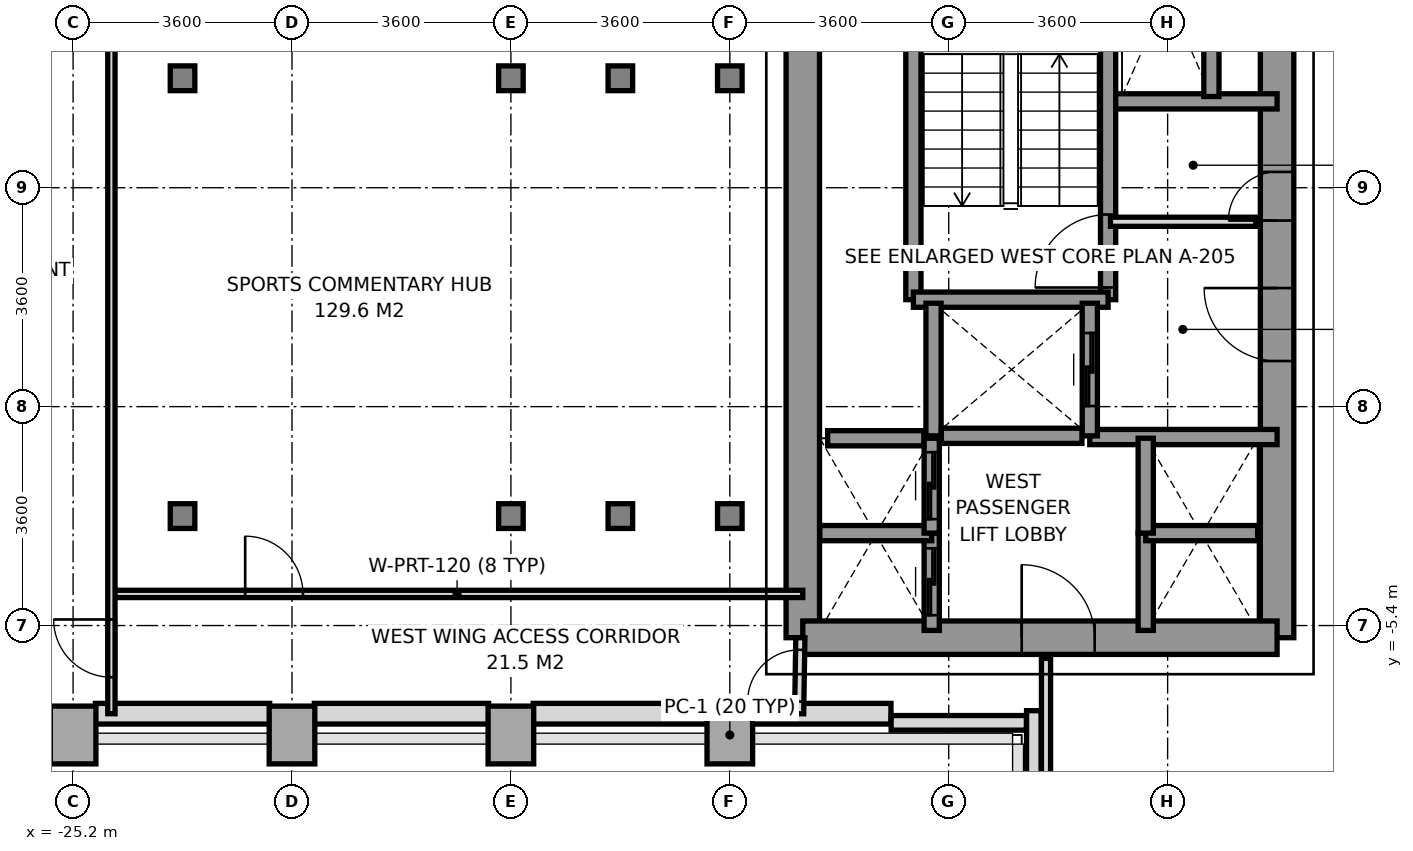
"""IFC4 building model, lengths in metres.
Left out: names, types, materials, properties, quantities, classifications, styles, units other than length and angle.
Written with IfcOpenShell. Run it as: python <this file> out.ifc"""

import sys

from ifc_helpers import new_model, si_unit, direction, frame, frame_2d, origin, origin_2d, place, context, subcontext, project, spatial, rectangle, i_section, extrude, source, transform, mapped, element, fill, save


model = new_model("IFC4")
c1 = context("Model", 3, precision=1e-05, world=origin(), true_north=direction((0.0, 1.0)))
c2 = subcontext(c1, "Body", "Model", "MODEL_VIEW")
j1 = project(units=[si_unit("LENGTHUNIT", "METRE"), si_unit("PLANEANGLEUNIT", "RADIAN")], contexts=[c1])
p1 = place(None, origin())
s1 = spatial("IfcSite", under=j1, at=p1, CompositionType="ELEMENT")
p2 = place(p1, origin())
s2 = spatial("IfcBuilding", under=s1, at=p2, CompositionType="ELEMENT")
p3 = place(p2, frame((0.0, 0.0, 74.8)))
s3 = spatial("IfcBuildingStorey", under=s2, at=p3, CompositionType="ELEMENT", Elevation=74.8)
m1 = source(origin(), c2, "Body", "SweptSolid", [
    extrude(rectangle(XDim=0.75, YDim=0.95, at=origin_2d()), origin(), (0.0, 0.0, 1.0), 3.2),
])
p4 = place(p3, frame((-25.2, -7.2, 0.0), z_axis=(0.0, 0.0, 1.0), x_axis=(1.0, 0.0, 0.0)))
e1 = element("IfcColumn", 1, at=p4, inside=s3, PredefinedType="COLUMN", context=c2, shape_type="MappedRepresentation", body=[
    mapped(m1, transform((0.0, 0.0, 0.0), x_axis=(1.0, 0.0, 0.0), y_axis=(0.0, 1.0, 0.0), z_axis=(0.0, 0.0, 1.0), scale=1.0)),
])
m2 = source(origin(), c2, "Body", "SweptSolid", [
    extrude(i_section(OverallWidth=0.404, OverallDepth=0.407, WebThickness=0.022, FlangeThickness=0.035, at=origin_2d()), origin(), (0.0, 0.0, 1.0), 3.2),
])
for number, where, z_axis, x_axis in (
    (2, (-23.4, -3.6, 0.0), (0.0, 0.0, 1.0), (1.0, 0.0, 0.0)),
    (3, (-23.4, 3.6, 0.0), (0.0, 0.0, 1.0), (1.0, 0.0, 0.0)),
):
    element("IfcColumn", number, at=place(p3, frame(where, z_axis=z_axis, x_axis=x_axis)), inside=s3, PredefinedType="COLUMN", context=c2, shape_type="MappedRepresentation", body=[
        mapped(m2, transform((0.0, 0.0, 0.0), x_axis=(1.0, 0.0, 0.0), y_axis=(0.0, 1.0, 0.0), z_axis=(0.0, 0.0, 1.0), scale=1.0)),
    ])
for number, where, z_axis, x_axis in (
    (4, (-21.6, -7.2, 0.0), (0.0, 0.0, 1.0), (1.0, 0.0, 0.0)),
    (5, (-18.0, -7.2, 0.0), (0.0, 0.0, 1.0), (1.0, 0.0, 0.0)),
):
    element("IfcColumn", number, at=place(p3, frame(where, z_axis=z_axis, x_axis=x_axis)), inside=s3, PredefinedType="COLUMN", context=c2, shape_type="MappedRepresentation", body=[
        mapped(m1, transform((0.0, 0.0, 0.0), x_axis=(1.0, 0.0, 0.0), y_axis=(0.0, 1.0, 0.0), z_axis=(0.0, 0.0, 1.0), scale=1.0)),
    ])
for number, where, z_axis, x_axis in (
    (6, (-18.0, -3.6, 0.0), (0.0, 0.0, 1.0), (1.0, 0.0, 0.0)),
    (7, (-18.0, 3.6, 0.0), (0.0, 0.0, 1.0), (1.0, 0.0, 0.0)),
    (8, (-16.2, -3.6, 0.0), (0.0, 0.0, 1.0), (1.0, 0.0, 0.0)),
    (9, (-16.2, 3.6, 0.0), (0.0, 0.0, 1.0), (1.0, 0.0, 0.0)),
):
    element("IfcColumn", number, at=place(p3, frame(where, z_axis=z_axis, x_axis=x_axis)), inside=s3, PredefinedType="COLUMN", context=c2, shape_type="MappedRepresentation", body=[
        mapped(m2, transform((0.0, 0.0, 0.0), x_axis=(1.0, 0.0, 0.0), y_axis=(0.0, 1.0, 0.0), z_axis=(0.0, 0.0, 1.0), scale=1.0)),
    ])
p5 = place(p3, frame((-14.4, -7.2, 0.0), z_axis=(0.0, 0.0, 1.0), x_axis=(1.0, 0.0, 0.0)))
e10 = element("IfcColumn", 10, at=p5, inside=s3, PredefinedType="COLUMN", context=c2, shape_type="MappedRepresentation", body=[
    mapped(m1, transform((0.0, 0.0, 0.0), x_axis=(1.0, 0.0, 0.0), y_axis=(0.0, 1.0, 0.0), z_axis=(0.0, 0.0, 1.0), scale=1.0)),
])
for number, where, z_axis, x_axis in (
    (11, (-14.4, -3.6, 0.0), (0.0, 0.0, 1.0), (1.0, 0.0, 0.0)),
    (12, (-14.4, 3.6, 0.0), (0.0, 0.0, 1.0), (1.0, 0.0, 0.0)),
):
    element("IfcColumn", number, at=place(p3, frame(where, z_axis=z_axis, x_axis=x_axis)), inside=s3, PredefinedType="COLUMN", context=c2, shape_type="MappedRepresentation", body=[
        mapped(m2, transform((0.0, 0.0, 0.0), x_axis=(1.0, 0.0, 0.0), y_axis=(0.0, 1.0, 0.0), z_axis=(0.0, 0.0, 1.0), scale=1.0)),
    ])
for number, where, z_axis, x_axis in (
    (13, (-24.833, -6.85, 0.0), (0.0, 0.0, 1.0), (1.0, 0.0, 0.0)),
    (14, (-21.233, -6.85, 0.0), (0.0, 0.0, 1.0), (1.0, 0.0, 0.0)),
    (15, (-17.633, -6.85, 0.0), (0.0, 0.0, 1.0), (1.0, 0.0, 0.0)),
):
    element("IfcWall", number, at=place(p3, frame(where, z_axis=z_axis, x_axis=x_axis)), inside=s3, PredefinedType="SOLIDWALL", context=c2, shape_type="SweptSolid", body=[
        extrude(rectangle(XDim=2.866, YDim=0.34, at=frame_2d((1.433, 0.0))), origin(), (0.0, 0.0, 1.0), 2.45),
    ])
p6 = place(p3, frame((-14.033, -6.85, 0.0), z_axis=(0.0, 0.0, 1.0), x_axis=(1.0, 0.0, 0.0)))
e16 = element("IfcWall", 16, at=p6, inside=s3, PredefinedType="SOLIDWALL", context=c2, shape_type="SweptSolid", body=[
    extrude(rectangle(XDim=2.283, YDim=0.34, at=frame_2d((1.142, 0.0))), origin(), (0.0, 0.0, 1.0), 3.2),
])
p7 = place(p3, frame((-9.4, -8.397, 0.0), z_axis=(0.0, 0.0, 1.0), x_axis=(0.0, 1.0, 0.0)))
e17 = element("IfcWall", 17, at=p7, inside=s3, PredefinedType="PARAPET", context=c2, shape_type="SweptSolid", body=[
    extrude(rectangle(XDim=1.597, YDim=0.24, at=frame_2d((0.798, 0.0))), origin(), (0.0, 0.0, 1.0), 1.15),
])
p8 = place(p3, frame((-9.523, -7.0, 0.0), z_axis=(0.0, 0.0, 1.0), x_axis=(-1.0, 0.0, 0.0)))
e18 = element("IfcWall", 18, at=p8, inside=s3, PredefinedType="PARAPET", context=c2, shape_type="SweptSolid", body=[
    extrude(rectangle(XDim=2.224, YDim=0.24, at=frame_2d((1.112, 0.0))), origin(), (0.0, 0.0, 1.0), 1.15),
])
p9 = place(p3, frame((-13.2, -5.6, 0.0), z_axis=(0.0, 0.0, 1.0), x_axis=(0.0, 1.0, 0.0)))
e19 = element("IfcWall", 19, at=p9, inside=s3, PredefinedType="SHEAR", context=c2, shape_type="SweptSolid", body=[
    extrude(rectangle(XDim=11.2, YDim=0.55, at=frame_2d((5.6, 0.0))), origin(), (0.0, 0.0, 1.0), 3.2),
])
p10 = place(p3, frame((-5.4, -5.6, 0.0), z_axis=(0.0, 0.0, 1.0), x_axis=(0.0, 1.0, 0.0)))
e20 = element("IfcWall", 20, at=p10, inside=s3, PredefinedType="SHEAR", context=c2, shape_type="SweptSolid", body=[
    extrude(rectangle(XDim=12.5, YDim=0.55, at=frame_2d((6.25, 0.0))), origin(), (0.0, 0.0, 1.0), 3.2),
])
p11 = place(p10, frame((4.55, 0.0, 0.0)))
e21 = element("IfcOpeningElement", 21, at=p11, cuts=e20, PredefinedType="OPENING", context=c2, shape_type="SweptSolid", body=[
    extrude(rectangle(XDim=1.2, YDim=2.2, at=frame_2d((0.6, 1.1))), frame((0.0, 0.285, 0.0), z_axis=(0.0, -1.0, 0.0), x_axis=(1.0, 0.0, 0.0)), (0.0, 0.0, 1.0), 0.57),
])
p12 = place(p10, frame((6.86, 0.0, 0.0)))
e22 = element("IfcOpeningElement", 22, at=p12, cuts=e20, PredefinedType="OPENING", context=c2, shape_type="SweptSolid", body=[
    extrude(rectangle(XDim=0.8, YDim=2.1, at=frame_2d((0.4, 1.05))), frame((0.0, 0.285, 0.0), z_axis=(0.0, -1.0, 0.0), x_axis=(1.0, 0.0, 0.0)), (0.0, 0.0, 1.0), 0.57),
])
p13 = place(p3, frame((-13.2, -5.6, 0.0), z_axis=(0.0, 0.0, 1.0), x_axis=(1.0, 0.0, 0.0)))
e23 = element("IfcWall", 23, at=p13, inside=s3, PredefinedType="SHEAR", context=c2, shape_type="SweptSolid", body=[
    extrude(rectangle(XDim=7.8, YDim=0.55, at=frame_2d((3.9, 0.0))), origin(), (0.0, 0.0, 1.0), 3.2),
])
p14 = place(p13, frame((3.6, 0.0, 0.0)))
e24 = element("IfcOpeningElement", 24, at=p14, cuts=e23, PredefinedType="OPENING", context=c2, shape_type="SweptSolid", body=[
    extrude(rectangle(XDim=1.2, YDim=2.2, at=frame_2d((0.6, 1.1))), frame((0.0, 0.285, 0.0), z_axis=(0.0, -1.0, 0.0), x_axis=(1.0, 0.0, 0.0)), (0.0, 0.0, 1.0), 0.57),
])
p15 = place(p3, frame((-8.18, 3.22, 0.0), z_axis=(0.0, 0.0, 1.0), x_axis=(1.0, 0.0, 0.0)))
e25 = element("IfcWall", 25, at=p15, inside=s3, PredefinedType="SOLIDWALL", context=c2, shape_type="SweptSolid", body=[
    extrude(rectangle(XDim=2.78, YDim=0.25, at=frame_2d((1.39, 0.0))), origin(), (0.0, 0.0, 1.0), 3.2),
])
p16 = place(p3, frame((-8.48, -2.3, 0.0), z_axis=(0.0, 0.0, 1.0), x_axis=(1.0, 0.0, 0.0)))
e26 = element("IfcWall", 26, at=p16, inside=s3, PredefinedType="SOLIDWALL", context=c2, shape_type="SweptSolid", body=[
    extrude(rectangle(XDim=3.08, YDim=0.25, at=frame_2d((1.54, 0.0))), origin(), (0.0, 0.0, 1.0), 3.2),
])
p17 = place(p3, frame((-8.179, -0.041, 0.0), z_axis=(0.0, 0.0, 1.0), x_axis=(0.0, 1.0, 0.0)))
e27 = element("IfcWall", 27, at=p17, inside=s3, PredefinedType="SOLIDWALL", context=c2, shape_type="SweptSolid", body=[
    extrude(rectangle(XDim=6.941, YDim=0.25, at=frame_2d((3.47, 0.0))), origin(), (0.0, 0.0, 1.0), 3.2),
])
p18 = place(p17, frame((0.2, 0.0, 0.0)))
e28 = element("IfcOpeningElement", 28, at=p18, cuts=e27, PredefinedType="OPENING", context=c2, shape_type="SweptSolid", body=[
    extrude(rectangle(XDim=1.2, YDim=2.2, at=frame_2d((0.6, 1.1))), frame((0.0, 0.135, 0.0), z_axis=(0.0, -1.0, 0.0), x_axis=(1.0, 0.0, 0.0)), (0.0, 0.0, 1.0), 0.27),
])
p19 = place(p3, frame((-11.381, -0.041, 0.0), z_axis=(0.0, 0.0, 1.0), x_axis=(0.0, 1.0, 0.0)))
e29 = element("IfcWall", 29, at=p19, inside=s3, PredefinedType="SOLIDWALL", context=c2, shape_type="SweptSolid", body=[
    extrude(rectangle(XDim=6.941, YDim=0.25, at=frame_2d((3.47, 0.0))), origin(), (0.0, 0.0, 1.0), 3.2),
])
p20 = place(p3, frame((-11.381, -0.041, 0.0), z_axis=(0.0, 0.0, 1.0), x_axis=(1.0, 0.0, 0.0)))
e30 = element("IfcWall", 30, at=p20, inside=s3, PredefinedType="SOLIDWALL", context=c2, shape_type="SweptSolid", body=[
    extrude(rectangle(XDim=3.202, YDim=0.25, at=frame_2d((1.601, 0.0))), origin(), (0.0, 0.0, 1.0), 3.2),
])
p21 = place(p3, frame((-11.05, -2.28, 0.0), z_axis=(0.0, 0.0, 1.0), x_axis=(0.0, 1.0, 0.0)))
e31 = element("IfcWall", 31, at=p21, inside=s3, PredefinedType="SOLIDWALL", context=c2, shape_type="SweptSolid", body=[
    extrude(rectangle(XDim=2.18, YDim=0.25, at=frame_2d((1.09, 0.0))), origin(), (0.0, 0.0, 1.0), 3.2),
])
p22 = place(p3, frame((-8.48, -2.28, 0.0), z_axis=(0.0, 0.0, 1.0), x_axis=(0.0, 1.0, 0.0)))
e32 = element("IfcWall", 32, at=p22, inside=s3, PredefinedType="SOLIDWALL", context=c2, shape_type="SweptSolid", body=[
    extrude(rectangle(XDim=2.18, YDim=0.25, at=frame_2d((1.09, 0.0))), origin(), (0.0, 0.0, 1.0), 3.2),
])
p23 = place(p22, frame((0.49, 0.0, 0.0)))
e33 = element("IfcOpeningElement", 33, at=p23, cuts=e32, PredefinedType="OPENING", context=c2, shape_type="SweptSolid", body=[
    extrude(rectangle(XDim=1.2, YDim=2.2, at=frame_2d((0.6, 1.1))), frame((0.0, 0.135, 0.0), z_axis=(0.0, -1.0, 0.0), x_axis=(1.0, 0.0, 0.0)), (0.0, 0.0, 1.0), 0.27),
])
p24 = place(p3, frame((-10.921, -2.28, 0.0), z_axis=(0.0, 0.0, 1.0), x_axis=(1.0, 0.0, 0.0)))
e34 = element("IfcWall", 34, at=p24, inside=s3, PredefinedType="SOLIDWALL", context=c2, shape_type="SweptSolid", body=[
    extrude(rectangle(XDim=2.312, YDim=0.25, at=frame_2d((1.156, 0.0))), origin(), (0.0, 0.0, 1.0), 3.2),
])
p25 = place(p3, frame((-11.08, -5.48, 0.0), z_axis=(0.0, 0.0, 1.0), x_axis=(0.0, 1.0, 0.0)))
e35 = element("IfcWall", 35, at=p25, inside=s3, PredefinedType="SOLIDWALL", context=c2, shape_type="SweptSolid", body=[
    extrude(rectangle(XDim=1.6, YDim=0.25, at=frame_2d((0.8, 0.0))), origin(), (0.0, 0.0, 1.0), 3.2),
])
p26 = place(p25, frame((0.25, 0.0, 0.0)))
e36 = element("IfcOpeningElement", 36, at=p26, cuts=e35, PredefinedType="OPENING", context=c2, shape_type="SweptSolid", body=[
    extrude(rectangle(XDim=1.1, YDim=2.2, at=frame_2d((0.55, 1.1))), frame((0.0, 0.135, 0.0), z_axis=(0.0, -1.0, 0.0), x_axis=(1.0, 0.0, 0.0)), (0.0, 0.0, 1.0), 0.27),
])
p27 = place(p3, frame((-12.92, -3.88, 0.0), z_axis=(0.0, 0.0, 1.0), x_axis=(1.0, 0.0, 0.0)))
e37 = element("IfcWall", 37, at=p27, inside=s3, PredefinedType="SOLIDWALL", context=c2, shape_type="SweptSolid", body=[
    extrude(rectangle(XDim=1.84, YDim=0.25, at=frame_2d((0.92, 0.0))), origin(), (0.0, 0.0, 1.0), 3.2),
])
p28 = place(p3, frame((-11.08, -3.88, 0.0), z_axis=(0.0, 0.0, 1.0), x_axis=(0.0, 1.0, 0.0)))
e38 = element("IfcWall", 38, at=p28, inside=s3, PredefinedType="SOLIDWALL", context=c2, shape_type="SweptSolid", body=[
    extrude(rectangle(XDim=1.56, YDim=0.25, at=frame_2d((0.78, 0.0))), origin(), (0.0, 0.0, 1.0), 3.2),
])
p29 = place(p28, frame((0.23, 0.0, 0.0)))
e39 = element("IfcOpeningElement", 39, at=p29, cuts=e38, PredefinedType="OPENING", context=c2, shape_type="SweptSolid", body=[
    extrude(rectangle(XDim=1.1, YDim=2.2, at=frame_2d((0.55, 1.1))), frame((0.0, 0.135, 0.0), z_axis=(0.0, -1.0, 0.0), x_axis=(1.0, 0.0, 0.0)), (0.0, 0.0, 1.0), 0.27),
])
p30 = place(p3, frame((-12.791, -2.32, 0.0), z_axis=(0.0, 0.0, 1.0), x_axis=(1.0, 0.0, 0.0)))
e40 = element("IfcWall", 40, at=p30, inside=s3, PredefinedType="SOLIDWALL", context=c2, shape_type="SweptSolid", body=[
    extrude(rectangle(XDim=1.582, YDim=0.25, at=frame_2d((0.791, 0.0))), origin(), (0.0, 0.0, 1.0), 3.2),
])
p31 = place(p3, frame((-7.56, -5.48, 0.0), z_axis=(0.0, 0.0, 1.0), x_axis=(0.0, 1.0, 0.0)))
e41 = element("IfcWall", 41, at=p31, inside=s3, PredefinedType="SOLIDWALL", context=c2, shape_type="SweptSolid", body=[
    extrude(rectangle(XDim=1.6, YDim=0.25, at=frame_2d((0.8, 0.0))), origin(), (0.0, 0.0, 1.0), 3.2),
])
p32 = place(p3, frame((-7.56, -3.88, 0.0), z_axis=(0.0, 0.0, 1.0), x_axis=(1.0, 0.0, 0.0)))
e42 = element("IfcWall", 42, at=p32, inside=s3, PredefinedType="SOLIDWALL", context=c2, shape_type="SweptSolid", body=[
    extrude(rectangle(XDim=1.84, YDim=0.25, at=frame_2d((0.92, 0.0))), origin(), (0.0, 0.0, 1.0), 3.2),
])
p33 = place(p3, frame((-7.56, -3.88, 0.0), z_axis=(0.0, 0.0, 1.0), x_axis=(0.0, 1.0, 0.0)))
e43 = element("IfcWall", 43, at=p33, inside=s3, PredefinedType="SOLIDWALL", context=c2, shape_type="SweptSolid", body=[
    extrude(rectangle(XDim=1.56, YDim=0.25, at=frame_2d((0.78, 0.0))), origin(), (0.0, 0.0, 1.0), 3.2),
])
p34 = place(p3, frame((-6.48, 3.3, 0.0), z_axis=(0.0, 0.0, 1.0), x_axis=(0.0, 1.0, 0.0)))
e44 = element("IfcWall", 44, at=p34, inside=s3, PredefinedType="SOLIDWALL", context=c2, shape_type="SweptSolid", body=[
    extrude(rectangle(XDim=1.68, YDim=0.25, at=frame_2d((0.84, 0.0))), origin(), (0.0, 0.0, 1.0), 3.2),
])
p35 = place(p3, frame((-8.14, 1.24, 0.0), z_axis=(0.0, 0.0, 1.0), x_axis=(1.0, 0.0, 0.0)))
e45 = element("IfcWall", 45, at=p35, inside=s3, PredefinedType="PARTITIONING", context=c2, shape_type="SweptSolid", body=[
    extrude(rectangle(XDim=2.39, YDim=0.15, at=frame_2d((1.195, 0.0))), origin(), (0.0, 0.0, 1.0), 2.3),
])
p36 = place(p3, frame((-9.2, -15.68, 0.0), z_axis=(0.0, 0.0, 1.0), x_axis=(0.0, 1.0, 0.0)))
e46 = element("IfcWall", 46, at=p36, inside=s3, PredefinedType="PARTITIONING", context=c2, shape_type="SweptSolid", body=[
    extrude(rectangle(XDim=9.74, YDim=0.15, at=frame_2d((4.87, 0.0))), origin(), (0.0, 0.0, 1.0), 2.71),
])
p37 = place(p3, frame((-13.26, -6.85, 0.0), z_axis=(0.0, 0.0, 1.0), x_axis=(0.016013571389, 0.999871774545, 0.0)))
e47 = element("IfcWall", 47, at=p37, inside=s3, PredefinedType="PARTITIONING", context=c2, shape_type="SweptSolid", body=[
    extrude(rectangle(XDim=1.25, YDim=0.15, at=frame_2d((0.625, 0.0))), origin(), (0.0, 0.0, 1.0), 3.2),
])
p38 = place(p37, frame((0.2, 0.0, 0.0)))
e48 = element("IfcOpeningElement", 48, at=p38, cuts=e47, PredefinedType="OPENING", context=c2, shape_type="SweptSolid", body=[
    extrude(rectangle(XDim=0.85, YDim=2.1, at=frame_2d((0.425, 1.05))), frame((0.0, 0.085, 0.0), z_axis=(0.0, -1.0, 0.0), x_axis=(1.0, 0.0, 0.0)), (0.0, 0.0, 1.0), 0.17),
])
p39 = place(p3, frame((-24.57, -4.88, 0.0), z_axis=(0.0, 0.0, 1.0), x_axis=(1.0, 0.0, 0.0)))
e49 = element("IfcWall", 49, at=p39, inside=s3, PredefinedType="PARTITIONING", context=c2, shape_type="SweptSolid", body=[
    extrude(rectangle(XDim=11.37, YDim=0.12, at=frame_2d((5.685, 0.0))), origin(), (0.0, 0.0, 1.0), 2.7),
])
p40 = place(p39, frame((2.2, 0.0, 0.0)))
e50 = element("IfcOpeningElement", 50, at=p40, cuts=e49, PredefinedType="OPENING", context=c2, shape_type="SweptSolid", body=[
    extrude(rectangle(XDim=0.95, YDim=2.15, at=frame_2d((0.475, 1.075))), frame((0.0, 0.07, 0.0), z_axis=(0.0, -1.0, 0.0), x_axis=(1.0, 0.0, 0.0)), (0.0, 0.0, 1.0), 0.14),
])
p41 = place(p3, frame((-24.57, -6.85, 0.0), z_axis=(0.0, 0.0, 1.0), x_axis=(0.0, 1.0, 0.0)))
e51 = element("IfcWall", 51, at=p41, inside=s3, PredefinedType="PARTITIONING", context=c2, shape_type="SweptSolid", body=[
    extrude(rectangle(XDim=13.7, YDim=0.12, at=frame_2d((6.85, 0.0))), origin(), (0.0, 0.0, 1.0), 2.71),
])
p42 = place(p41, frame((0.6, 0.0, 0.0)))
e52 = element("IfcOpeningElement", 52, at=p42, cuts=e51, PredefinedType="OPENING", context=c2, shape_type="SweptSolid", body=[
    extrude(rectangle(XDim=0.95, YDim=2.15, at=frame_2d((0.475, 1.075))), frame((0.0, 0.07, 0.0), z_axis=(0.0, -1.0, 0.0), x_axis=(1.0, 0.0, 0.0)), (0.0, 0.0, 1.0), 0.14),
])
m3 = source(origin(), c2, "Body", "SweptSolid", [
    extrude(rectangle(XDim=1.2, YDim=2.2, at=frame_2d((0.6, 1.1))), frame((0.0, 0.025, 0.0), z_axis=(0.0, -1.0, 0.0), x_axis=(1.0, 0.0, 0.0)), (0.0, 0.0, 1.0), 0.05),
])
p43 = place(p18, origin())
e53 = element("IfcDoor", 53, at=p43, inside=s3, OperationType="SINGLE_SWING_LEFT", PredefinedType="DOOR", context=c2, shape_type="MappedRepresentation", body=[
    mapped(m3, transform((0.0, 0.0, 0.0), x_axis=(1.0, 0.0, 0.0), y_axis=(0.0, 1.0, 0.0), z_axis=(0.0, 0.0, 1.0), scale=1.0)),
])
fill(e28, e53)
p44 = place(p11, origin())
e54 = element("IfcDoor", 54, at=p44, inside=s3, OperationType="SINGLE_SWING_RIGHT", PredefinedType="DOOR", context=c2, shape_type="MappedRepresentation", body=[
    mapped(m3, transform((0.0, 0.0, 0.0), x_axis=(1.0, 0.0, 0.0), y_axis=(0.0, 1.0, 0.0), z_axis=(0.0, 0.0, 1.0), scale=1.0)),
])
fill(e21, e54)
p45 = place(p14, origin())
e55 = element("IfcDoor", 55, at=p45, inside=s3, OperationType="SINGLE_SWING_LEFT", PredefinedType="DOOR", context=c2, shape_type="MappedRepresentation", body=[
    mapped(m3, transform((0.0, 0.0, 0.0), x_axis=(1.0, 0.0, 0.0), y_axis=(0.0, 1.0, 0.0), z_axis=(0.0, 0.0, 1.0), scale=1.0)),
])
fill(e24, e55)
m4 = source(origin(), c2, "Body", "SweptSolid", [
    extrude(rectangle(XDim=0.8, YDim=2.1, at=frame_2d((0.4, 1.05))), frame((0.0, 0.025, 0.0), z_axis=(0.0, -1.0, 0.0), x_axis=(1.0, 0.0, 0.0)), (0.0, 0.0, 1.0), 0.05),
])
p46 = place(p12, origin())
e56 = element("IfcDoor", 56, at=p46, inside=s3, OperationType="SINGLE_SWING_LEFT", PredefinedType="DOOR", context=c2, shape_type="MappedRepresentation", body=[
    mapped(m4, transform((0.0, 0.0, 0.0), x_axis=(1.0, 0.0, 0.0), y_axis=(0.0, 1.0, 0.0), z_axis=(0.0, 0.0, 1.0), scale=1.0)),
])
fill(e22, e56)
p47 = place(p23, origin())
e57 = element("IfcDoor", 57, at=p47, inside=s3, OperationType="SLIDING_TO_RIGHT", PredefinedType="DOOR", context=c2, shape_type="MappedRepresentation", body=[
    mapped(m3, transform((0.0, 0.0, 0.0), x_axis=(1.0, 0.0, 0.0), y_axis=(0.0, 1.0, 0.0), z_axis=(0.0, 0.0, 1.0), scale=1.0)),
])
fill(e33, e57)
m5 = source(origin(), c2, "Body", "SweptSolid", [
    extrude(rectangle(XDim=1.1, YDim=2.2, at=frame_2d((0.55, 1.1))), frame((0.0, 0.025, 0.0), z_axis=(0.0, -1.0, 0.0), x_axis=(1.0, 0.0, 0.0)), (0.0, 0.0, 1.0), 0.05),
])
p48 = place(p26, origin())
e58 = element("IfcDoor", 58, at=p48, inside=s3, OperationType="SLIDING_TO_LEFT", PredefinedType="DOOR", context=c2, shape_type="MappedRepresentation", body=[
    mapped(m5, transform((0.0, 0.0, 0.0), x_axis=(1.0, 0.0, 0.0), y_axis=(0.0, 1.0, 0.0), z_axis=(0.0, 0.0, 1.0), scale=1.0)),
])
fill(e36, e58)
p49 = place(p29, origin())
e59 = element("IfcDoor", 59, at=p49, inside=s3, OperationType="SLIDING_TO_LEFT", PredefinedType="DOOR", context=c2, shape_type="MappedRepresentation", body=[
    mapped(m5, transform((0.0, 0.0, 0.0), x_axis=(1.0, 0.0, 0.0), y_axis=(0.0, 1.0, 0.0), z_axis=(0.0, 0.0, 1.0), scale=1.0)),
])
fill(e39, e59)
m6 = source(origin(), c2, "Body", "SweptSolid", [
    extrude(rectangle(XDim=0.95, YDim=2.15, at=frame_2d((0.475, 1.075))), frame((0.0, 0.025, 0.0), z_axis=(0.0, -1.0, 0.0), x_axis=(1.0, 0.0, 0.0)), (0.0, 0.0, 1.0), 0.05),
])
p50 = place(p40, origin())
e60 = element("IfcDoor", 60, at=p50, inside=s3, OperationType="SINGLE_SWING_LEFT", PredefinedType="DOOR", context=c2, shape_type="MappedRepresentation", body=[
    mapped(m6, transform((0.0, 0.0, 0.0), x_axis=(1.0, 0.0, 0.0), y_axis=(0.0, 1.0, 0.0), z_axis=(0.0, 0.0, 1.0), scale=1.0)),
])
fill(e50, e60)
p51 = place(p42, origin())
e61 = element("IfcDoor", 61, at=p51, inside=s3, OperationType="SINGLE_SWING_RIGHT", PredefinedType="DOOR", context=c2, shape_type="MappedRepresentation", body=[
    mapped(m6, transform((0.0, 0.0, 0.0), x_axis=(1.0, 0.0, 0.0), y_axis=(0.0, 1.0, 0.0), z_axis=(0.0, 0.0, 1.0), scale=1.0)),
])
fill(e52, e61)
m7 = source(origin(), c2, "Body", "SweptSolid", [
    extrude(rectangle(XDim=0.85, YDim=2.1, at=frame_2d((0.425, 1.05))), frame((0.0, 0.025, 0.0), z_axis=(0.0, -1.0, 0.0), x_axis=(1.0, 0.0, 0.0)), (0.0, 0.0, 1.0), 0.05),
])
p52 = place(p38, origin())
e62 = element("IfcDoor", 62, at=p52, inside=s3, OperationType="SINGLE_SWING_LEFT", PredefinedType="DOOR", context=c2, shape_type="MappedRepresentation", body=[
    mapped(m7, transform((0.0, 0.0, 0.0), x_axis=(1.0, 0.0, 0.0), y_axis=(0.0, 1.0, 0.0), z_axis=(0.0, 0.0, 1.0), scale=1.0)),
])
fill(e48, e62)
save(model, sys.argv[1])
